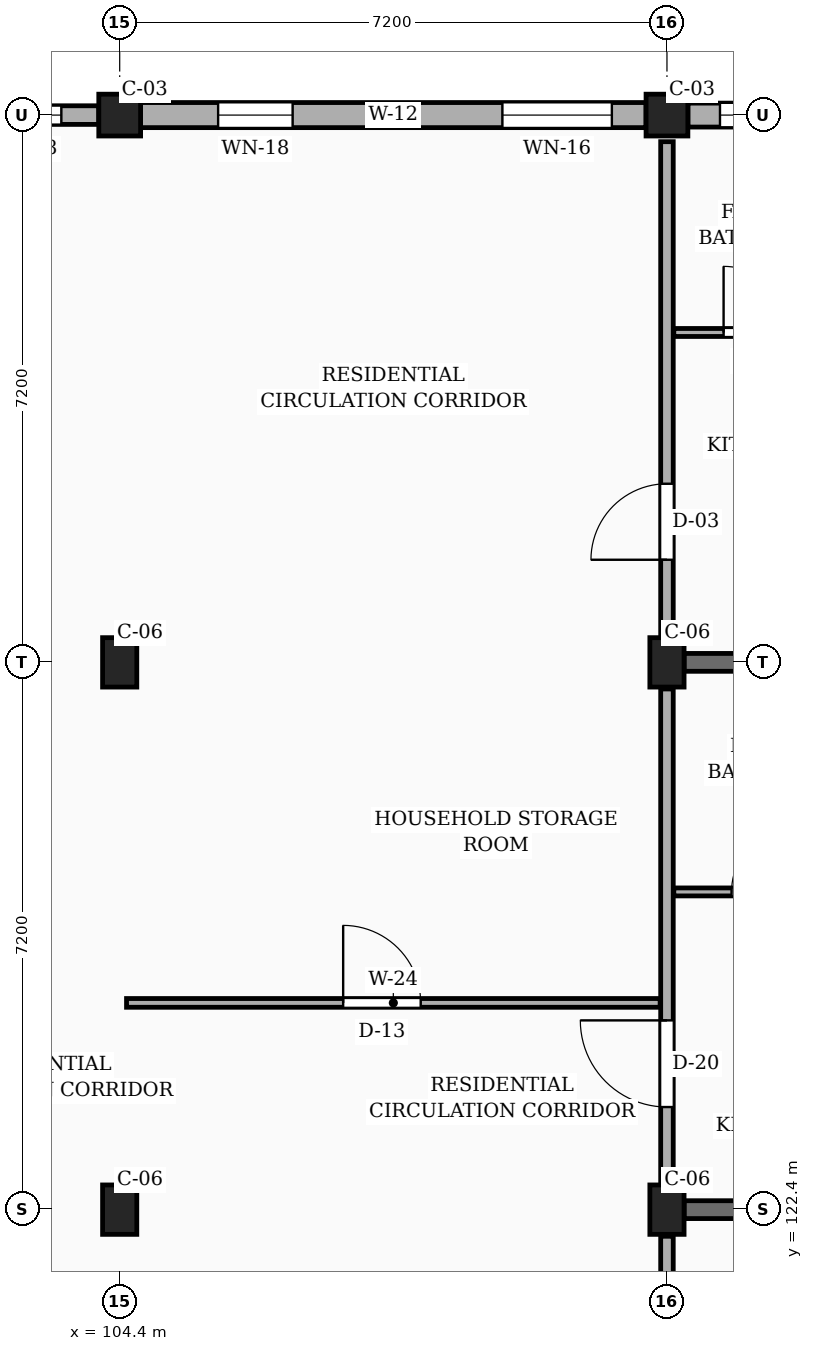
"""IFC4 building model, lengths in metres.
Left out: names, types, materials, properties, quantities, classifications, styles, units other than length and angle.
Written with IfcOpenShell. Run it as: python <this file> out.ifc"""

import sys

from ifc_helpers import new_model, si_unit, direction, frame, frame_2d, origin, origin_2d, place, context, subcontext, project, spatial, rectangle, extrude, element, fill, save


model = new_model("IFC4")
c1 = context("Model", 3, precision=1e-05, world=origin(), true_north=direction((0.0, 1.0)))
c2 = subcontext(c1, "Body", "Model", "MODEL_VIEW")
j1 = project(units=[si_unit("LENGTHUNIT", "METRE"), si_unit("PLANEANGLEUNIT", "RADIAN")], contexts=[c1])
p1 = place(None, origin())
s1 = spatial("IfcSite", under=j1, at=p1, CompositionType="ELEMENT")
p2 = place(p1, origin())
s2 = spatial("IfcBuilding", under=s1, at=p2, CompositionType="ELEMENT")
p3 = place(p2, frame((0.0, 0.0, 17.1)))
s3 = spatial("IfcBuildingStorey", under=s2, at=p3, CompositionType="ELEMENT", Elevation=17.1)
for number, where, z_axis, x_axis in (
    (1, (104.4, 122.4, 0.0), (0.0, 0.0, 1.0), (1.0, 0.0, 0.0)),
    (2, (104.4, 129.6, 0.0), (0.0, 0.0, 1.0), (1.0, 0.0, 0.0)),
):
    element("IfcColumn", number, at=place(p3, frame(where, z_axis=z_axis, x_axis=x_axis)), inside=s3, PredefinedType="COLUMN", context=c2, shape_type="SweptSolid", body=[
        extrude(rectangle(XDim=0.45, YDim=0.65, at=origin_2d()), origin(), (0.0, 0.0, 1.0), 3.15),
    ])
p4 = place(p3, frame((104.4, 136.8, 0.0), z_axis=(0.0, 0.0, 1.0), x_axis=(1.0, 0.0, 0.0)))
e3 = element("IfcColumn", 3, at=p4, inside=s3, PredefinedType="COLUMN", context=c2, shape_type="SweptSolid", body=[
    extrude(rectangle(XDim=0.55, YDim=0.55, at=origin_2d()), origin(), (0.0, 0.0, 1.0), 3.15),
])
for number, where, z_axis, x_axis in (
    (4, (111.6, 122.4, 0.0), (0.0, 0.0, 1.0), (1.0, 0.0, 0.0)),
    (5, (111.6, 129.6, 0.0), (0.0, 0.0, 1.0), (1.0, 0.0, 0.0)),
):
    element("IfcColumn", number, at=place(p3, frame(where, z_axis=z_axis, x_axis=x_axis)), inside=s3, PredefinedType="COLUMN", context=c2, shape_type="SweptSolid", body=[
        extrude(rectangle(XDim=0.45, YDim=0.65, at=origin_2d()), origin(), (0.0, 0.0, 1.0), 3.15),
    ])
p5 = place(p3, frame((111.6, 136.8, 0.0), z_axis=(0.0, 0.0, 1.0), x_axis=(1.0, 0.0, 0.0)))
e6 = element("IfcColumn", 6, at=p5, inside=s3, PredefinedType="COLUMN", context=c2, shape_type="SweptSolid", body=[
    extrude(rectangle(XDim=0.55, YDim=0.55, at=origin_2d()), origin(), (0.0, 0.0, 1.0), 3.15),
])
for number, where, z_axis, x_axis in (
    (7, (111.825, 122.4, 0.0), (0.0, 0.0, 1.0), (1.0, 0.0, 0.0)),
    (8, (111.825, 129.6, 0.0), (0.0, 0.0, 1.0), (1.0, 0.0, 0.0)),
):
    element("IfcWall", number, at=place(p3, frame(where, z_axis=z_axis, x_axis=x_axis)), inside=s3, PredefinedType="SOLIDWALL", context=c2, shape_type="SweptSolid", body=[
        extrude(rectangle(XDim=6.7, YDim=0.235, at=frame_2d((3.35, 0.0))), origin(), (0.0, 0.0, 1.0), 2.19),
    ])
p6 = place(p3, frame((118.525, 136.8, 0.0), z_axis=(0.0, 0.0, 1.0), x_axis=(-1.0, 0.0, 0.0)))
e9 = element("IfcWall", 9, at=p6, inside=s3, PredefinedType="SOLIDWALL", context=c2, shape_type="SweptSolid", body=[
    extrude(rectangle(XDim=6.65, YDim=0.315, at=frame_2d((3.325, 0.0))), origin(), (0.0, 0.0, 1.0), 2.46),
])
p7 = place(p6, frame((1.722, 0.0, 0.78)))
e10 = element("IfcOpeningElement", 10, at=p7, cuts=e9, PredefinedType="OPENING", context=c2, shape_type="SweptSolid", body=[
    extrude(rectangle(XDim=1.28, YDim=1.26, at=frame_2d((0.64, 0.63))), frame((0.0, 0.167, 0.0), z_axis=(0.0, -1.0, 0.0), x_axis=(1.0, 0.0, 0.0)), (0.0, 0.0, 1.0), 0.335),
])
p8 = place(p6, frame((4.867, 0.0, 0.78)))
e11 = element("IfcOpeningElement", 11, at=p8, cuts=e9, PredefinedType="OPENING", context=c2, shape_type="SweptSolid", body=[
    extrude(rectangle(XDim=1.36, YDim=1.26, at=frame_2d((0.68, 0.63))), frame((0.0, 0.167, 0.0), z_axis=(0.0, -1.0, 0.0), x_axis=(1.0, 0.0, 0.0)), (0.0, 0.0, 1.0), 0.335),
])
p9 = place(p3, frame((111.325, 136.8, 0.0), z_axis=(0.0, 0.0, 1.0), x_axis=(-1.0, 0.0, 0.0)))
e12 = element("IfcWall", 12, at=p9, inside=s3, PredefinedType="SOLIDWALL", context=c2, shape_type="SweptSolid", body=[
    extrude(rectangle(XDim=6.65, YDim=0.33, at=frame_2d((3.325, 0.0))), origin(), (0.0, 0.0, 1.0), 2.46),
])
p10 = place(p9, frame((0.45, 0.0, 0.78)))
e13 = element("IfcOpeningElement", 13, at=p10, cuts=e12, PredefinedType="OPENING", context=c2, shape_type="SweptSolid", body=[
    extrude(rectangle(XDim=1.44, YDim=1.26, at=frame_2d((0.72, 0.63))), frame((0.0, 0.175, 0.0), z_axis=(0.0, -1.0, 0.0), x_axis=(1.0, 0.0, 0.0)), (0.0, 0.0, 1.0), 0.35),
])
p11 = place(p9, frame((4.65, 0.0, 0.78)))
e14 = element("IfcOpeningElement", 14, at=p11, cuts=e12, PredefinedType="OPENING", context=c2, shape_type="SweptSolid", body=[
    extrude(rectangle(XDim=0.98, YDim=1.36, at=frame_2d((0.49, 0.68))), frame((0.0, 0.175, 0.0), z_axis=(0.0, -1.0, 0.0), x_axis=(1.0, 0.0, 0.0)), (0.0, 0.0, 1.0), 0.35),
])
p12 = place(p3, frame((104.125, 136.8, 0.0), z_axis=(0.0, 0.0, 1.0), x_axis=(-1.0, 0.0, 0.0)))
e15 = element("IfcWall", 15, at=p12, inside=s3, PredefinedType="SOLIDWALL", context=c2, shape_type="SweptSolid", body=[
    extrude(rectangle(XDim=6.65, YDim=0.245, at=frame_2d((3.325, 0.0))), origin(), (0.0, 0.0, 1.0), 2.46),
])
p13 = place(p12, frame((0.492, 0.0, 0.78)))
e16 = element("IfcOpeningElement", 16, at=p13, cuts=e15, PredefinedType="OPENING", context=c2, shape_type="SweptSolid", body=[
    extrude(rectangle(XDim=0.98, YDim=1.36, at=frame_2d((0.49, 0.68))), frame((0.0, 0.133, 0.0), z_axis=(0.0, -1.0, 0.0), x_axis=(1.0, 0.0, 0.0)), (0.0, 0.0, 1.0), 0.265),
])
p14 = place(p12, frame((2.955, 0.0, 0.78)))
e17 = element("IfcOpeningElement", 17, at=p14, cuts=e15, PredefinedType="OPENING", context=c2, shape_type="SweptSolid", body=[
    extrude(rectangle(XDim=1.14, YDim=1.36, at=frame_2d((0.57, 0.68))), frame((0.0, 0.133, 0.0), z_axis=(0.0, -1.0, 0.0), x_axis=(1.0, 0.0, 0.0)), (0.0, 0.0, 1.0), 0.265),
])
p15 = place(p3, frame((111.6, 115.55, 0.0), z_axis=(0.0, 0.0, 1.0), x_axis=(0.0, 1.0, 0.0)))
e18 = element("IfcWall", 18, at=p15, inside=s3, PredefinedType="PARTITIONING", context=c2, shape_type="SweptSolid", body=[
    extrude(rectangle(XDim=6.5, YDim=0.165, at=frame_2d((3.25, 0.0))), origin(), (0.0, 0.0, 1.0), 2.325),
])
p16 = place(p15, frame((1.1, 0.0, 0.0)))
e19 = element("IfcOpeningElement", 19, at=p16, cuts=e18, PredefinedType="OPENING", context=c2, shape_type="SweptSolid", body=[
    extrude(rectangle(XDim=0.94, YDim=2.12, at=frame_2d((0.47, 1.06))), frame((0.0, 0.093, 0.0), z_axis=(0.0, -1.0, 0.0), x_axis=(1.0, 0.0, 0.0)), (0.0, 0.0, 1.0), 0.185),
])
p17 = place(p3, frame((111.6, 122.75, 0.0), z_axis=(0.0, 0.0, 1.0), x_axis=(0.0, 1.0, 0.0)))
e20 = element("IfcWall", 20, at=p17, inside=s3, PredefinedType="PARTITIONING", context=c2, shape_type="SweptSolid", body=[
    extrude(rectangle(XDim=6.5, YDim=0.165, at=frame_2d((3.25, 0.0))), origin(), (0.0, 0.0, 1.0), 2.325),
])
p18 = place(p17, frame((1.0, 0.0, 0.0)))
e21 = element("IfcOpeningElement", 21, at=p18, cuts=e20, PredefinedType="OPENING", context=c2, shape_type="SweptSolid", body=[
    extrude(rectangle(XDim=1.14, YDim=2.18, at=frame_2d((0.57, 1.09))), frame((0.0, 0.093, 0.0), z_axis=(0.0, -1.0, 0.0), x_axis=(1.0, 0.0, 0.0)), (0.0, 0.0, 1.0), 0.185),
])
p19 = place(p3, frame((111.6, 129.95, 0.0), z_axis=(0.0, 0.0, 1.0), x_axis=(0.0, 1.0, 0.0)))
e22 = element("IfcWall", 22, at=p19, inside=s3, PredefinedType="PARTITIONING", context=c2, shape_type="SweptSolid", body=[
    extrude(rectangle(XDim=6.5, YDim=0.165, at=frame_2d((3.25, 0.0))), origin(), (0.0, 0.0, 1.0), 2.325),
])
p20 = place(p19, frame((1.0, 0.0, 0.0)))
e23 = element("IfcOpeningElement", 23, at=p20, cuts=e22, PredefinedType="OPENING", context=c2, shape_type="SweptSolid", body=[
    extrude(rectangle(XDim=1.0, YDim=2.15, at=frame_2d((0.5, 1.075))), frame((0.0, 0.093, 0.0), z_axis=(0.0, -1.0, 0.0), x_axis=(1.0, 0.0, 0.0)), (0.0, 0.0, 1.0), 0.185),
])
p21 = place(p3, frame((104.49, 125.12, 0.0), z_axis=(0.0, 0.0, 1.0), x_axis=(1.0, 0.0, 0.0)))
e24 = element("IfcWall", 24, at=p21, inside=s3, PredefinedType="PARTITIONING", context=c2, shape_type="SweptSolid", body=[
    extrude(rectangle(XDim=7.02, YDim=0.115, at=frame_2d((3.51, 0.0))), origin(), (0.0, 0.0, 1.0), 2.325),
])
p22 = place(p21, frame((2.85, 0.0, 0.0)))
e25 = element("IfcOpeningElement", 25, at=p22, cuts=e24, PredefinedType="OPENING", context=c2, shape_type="SweptSolid", body=[
    extrude(rectangle(XDim=1.02, YDim=2.15, at=frame_2d((0.51, 1.075))), frame((0.0, 0.067, 0.0), z_axis=(0.0, -1.0, 0.0), x_axis=(1.0, 0.0, 0.0)), (0.0, 0.0, 1.0), 0.135),
])
p23 = place(p3, frame((111.69, 126.58, 0.0), z_axis=(0.0, 0.0, 1.0), x_axis=(1.0, 0.0, 0.0)))
e26 = element("IfcWall", 26, at=p23, inside=s3, PredefinedType="PARTITIONING", context=c2, shape_type="SweptSolid", body=[
    extrude(rectangle(XDim=2.42, YDim=0.105, at=frame_2d((1.21, 0.0))), origin(), (0.0, 0.0, 1.0), 2.325),
])
p24 = place(p23, frame((0.76, 0.0, 0.0)))
e27 = element("IfcOpeningElement", 27, at=p24, cuts=e26, PredefinedType="OPENING", context=c2, shape_type="SweptSolid", body=[
    extrude(rectangle(XDim=0.9, YDim=2.05, at=frame_2d((0.45, 1.025))), frame((0.0, 0.062, 0.0), z_axis=(0.0, -1.0, 0.0), x_axis=(1.0, 0.0, 0.0)), (0.0, 0.0, 1.0), 0.125),
])
p25 = place(p3, frame((111.69, 133.94, 0.0), z_axis=(0.0, 0.0, 1.0), x_axis=(1.0, 0.0, 0.0)))
e28 = element("IfcWall", 28, at=p25, inside=s3, PredefinedType="PARTITIONING", context=c2, shape_type="SweptSolid", body=[
    extrude(rectangle(XDim=2.18, YDim=0.105, at=frame_2d((1.09, 0.0))), origin(), (0.0, 0.0, 1.0), 2.325),
])
p26 = place(p25, frame((0.655, 0.0, 0.0)))
e29 = element("IfcOpeningElement", 29, at=p26, cuts=e28, PredefinedType="OPENING", context=c2, shape_type="SweptSolid", body=[
    extrude(rectangle(XDim=0.87, YDim=2.05, at=frame_2d((0.435, 1.025))), frame((0.0, 0.062, 0.0), z_axis=(0.0, -1.0, 0.0), x_axis=(1.0, 0.0, 0.0)), (0.0, 0.0, 1.0), 0.125),
])
p27 = place(p8, origin())
e30 = element("IfcWindow", 30, at=p27, inside=s3, PartitioningType="SINGLE_PANEL", PredefinedType="WINDOW", context=c2, shape_type="SweptSolid", body=[
    extrude(rectangle(XDim=1.36, YDim=1.26, at=frame_2d((0.68, 0.63))), frame((0.0, 0.03, 0.0), z_axis=(0.0, -1.0, 0.0), x_axis=(1.0, 0.0, 0.0)), (0.0, 0.0, 1.0), 0.06),
])
fill(e11, e30)
p28 = place(p10, origin())
e31 = element("IfcWindow", 31, at=p28, inside=s3, PartitioningType="SINGLE_PANEL", PredefinedType="WINDOW", context=c2, shape_type="SweptSolid", body=[
    extrude(rectangle(XDim=1.44, YDim=1.26, at=frame_2d((0.72, 0.63))), frame((0.0, 0.03, 0.0), z_axis=(0.0, -1.0, 0.0), x_axis=(1.0, 0.0, 0.0)), (0.0, 0.0, 1.0), 0.06),
])
fill(e13, e31)
p29 = place(p11, origin())
e32 = element("IfcWindow", 32, at=p29, inside=s3, PartitioningType="SINGLE_PANEL", PredefinedType="WINDOW", context=c2, shape_type="SweptSolid", body=[
    extrude(rectangle(XDim=0.98, YDim=1.36, at=frame_2d((0.49, 0.68))), frame((0.0, 0.03, 0.0), z_axis=(0.0, -1.0, 0.0), x_axis=(1.0, 0.0, 0.0)), (0.0, 0.0, 1.0), 0.06),
])
fill(e14, e32)
p30 = place(p13, origin())
e33 = element("IfcWindow", 33, at=p30, inside=s3, PartitioningType="SINGLE_PANEL", PredefinedType="WINDOW", context=c2, shape_type="SweptSolid", body=[
    extrude(rectangle(XDim=0.98, YDim=1.36, at=frame_2d((0.49, 0.68))), frame((0.0, 0.03, 0.0), z_axis=(0.0, -1.0, 0.0), x_axis=(1.0, 0.0, 0.0)), (0.0, 0.0, 1.0), 0.06),
])
fill(e16, e33)
p31 = place(p18, origin())
e34 = element("IfcDoor", 34, at=p31, inside=s3, OperationType="SINGLE_SWING_RIGHT", PredefinedType="DOOR", context=c2, shape_type="SweptSolid", body=[
    extrude(rectangle(XDim=1.14, YDim=2.18, at=frame_2d((0.57, 1.09))), frame((0.0, 0.025, 0.0), z_axis=(0.0, -1.0, 0.0), x_axis=(1.0, 0.0, 0.0)), (0.0, 0.0, 1.0), 0.05),
])
fill(e21, e34)
p32 = place(p20, origin())
e35 = element("IfcDoor", 35, at=p32, inside=s3, OperationType="SINGLE_SWING_LEFT", PredefinedType="DOOR", context=c2, shape_type="SweptSolid", body=[
    extrude(rectangle(XDim=1.0, YDim=2.15, at=frame_2d((0.5, 1.075))), frame((0.0, 0.025, 0.0), z_axis=(0.0, -1.0, 0.0), x_axis=(1.0, 0.0, 0.0)), (0.0, 0.0, 1.0), 0.05),
])
fill(e23, e35)
p33 = place(p22, origin())
e36 = element("IfcDoor", 36, at=p33, inside=s3, OperationType="SINGLE_SWING_LEFT", PredefinedType="DOOR", context=c2, shape_type="SweptSolid", body=[
    extrude(rectangle(XDim=1.02, YDim=2.15, at=frame_2d((0.51, 1.075))), frame((0.0, 0.025, 0.0), z_axis=(0.0, -1.0, 0.0), x_axis=(1.0, 0.0, 0.0)), (0.0, 0.0, 1.0), 0.05),
])
fill(e25, e36)
p34 = place(p24, origin())
e37 = element("IfcDoor", 37, at=p34, inside=s3, OperationType="SINGLE_SWING_RIGHT", PredefinedType="DOOR", context=c2, shape_type="SweptSolid", body=[
    extrude(rectangle(XDim=0.9, YDim=2.05, at=frame_2d((0.45, 1.025))), frame((0.0, 0.025, 0.0), z_axis=(0.0, -1.0, 0.0), x_axis=(1.0, 0.0, 0.0)), (0.0, 0.0, 1.0), 0.05),
])
fill(e27, e37)
p35 = place(p26, origin())
e38 = element("IfcDoor", 38, at=p35, inside=s3, OperationType="SINGLE_SWING_LEFT", PredefinedType="DOOR", context=c2, shape_type="SweptSolid", body=[
    extrude(rectangle(XDim=0.87, YDim=2.05, at=frame_2d((0.435, 1.025))), frame((0.0, 0.025, 0.0), z_axis=(0.0, -1.0, 0.0), x_axis=(1.0, 0.0, 0.0)), (0.0, 0.0, 1.0), 0.05),
])
fill(e29, e38)
save(model, sys.argv[1])
